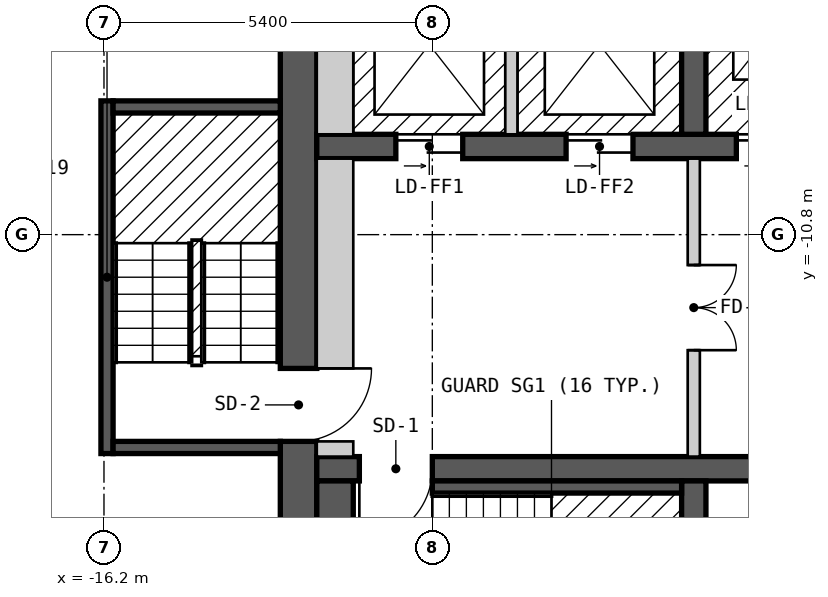
"""IFC4 building model, lengths in metres.
Left out: names, types, materials, properties, quantities, classifications, styles, units other than length and angle.
Written with IfcOpenShell. Run it as: python <this file> out.ifc"""

import sys

from ifc_helpers import new_model, si_unit, direction, frame, frame_2d, origin, origin_2d, place, context, subcontext, project, spatial, polyline, rectangle, outline, extrude, element, fill, save


model = new_model("IFC4")
c1 = context("Model", 3, precision=1e-05, world=origin(), true_north=direction((0.0, 1.0)))
c2 = subcontext(c1, "Body", "Model", "MODEL_VIEW")
j1 = project(units=[si_unit("LENGTHUNIT", "METRE"), si_unit("PLANEANGLEUNIT", "RADIAN")], contexts=[c1])
p1 = place(None, origin())
s1 = spatial("IfcSite", under=j1, at=p1, CompositionType="ELEMENT")
p2 = place(p1, origin())
s2 = spatial("IfcBuilding", under=s1, at=p2, CompositionType="ELEMENT")
p3 = place(p2, frame((0.0, 0.0, 166.2)))
s3 = spatial("IfcBuildingStorey", under=s2, at=p3, CompositionType="ELEMENT", Elevation=166.2)
p4 = place(p3, frame((-17.53, -15.736, 0.0), z_axis=(0.0, 0.0, 1.0), x_axis=(0.5, -0.866025403784, 0.0)))
e1 = element("IfcColumn", 1, at=p4, inside=s3, PredefinedType="COLUMN", context=c2, shape_type="SweptSolid", body=[
    extrude(rectangle(XDim=0.8, YDim=0.8, at=origin_2d()), origin(), (0.0, 0.0, 1.0), 3.0),
])
p5 = place(p3, frame((-13.0, -18.4, 0.0), z_axis=(0.0, 0.0, 1.0), x_axis=(0.0, 1.0, 0.0)))
e2 = element("IfcWall", 2, at=p5, inside=s3, PredefinedType="SHEAR", context=c2, shape_type="SweptSolid", body=[
    extrude(rectangle(XDim=12.8, YDim=0.6, at=frame_2d((6.4, 0.0))), origin(), (0.0, 0.0, 1.0), 2.7),
])
p6 = place(p5, frame((4.2, 0.0, 0.0)))
e3 = element("IfcOpeningElement", 3, at=p6, cuts=e2, PredefinedType="OPENING", context=c2, shape_type="SweptSolid", body=[
    extrude(rectangle(XDim=1.2, YDim=2.1, at=frame_2d((0.6, 1.05))), frame((0.0, 0.31, 0.0), z_axis=(0.0, -1.0, 0.0), x_axis=(1.0, 0.0, 0.0)), (0.0, 0.0, 1.0), 0.62),
])
p7 = place(p3, frame((-12.7, -14.65, 0.0), z_axis=(0.0, 0.0, 1.0), x_axis=(1.0, 0.0, 0.0)))
e4 = element("IfcWall", 4, at=p7, inside=s3, PredefinedType="SHEAR", context=c2, shape_type="SweptSolid", body=[
    extrude(rectangle(XDim=25.4, YDim=0.4, at=frame_2d((12.7, 0.0))), origin(), (0.0, 0.0, 1.0), 2.7),
])
p8 = place(p7, frame((1.9, 0.0, 0.0), z_axis=(0.0, 0.0, 1.0), x_axis=(-1.0, 0.0, 0.0)))
e5 = element("IfcOpeningElement", 5, at=p8, cuts=e4, PredefinedType="OPENING", context=c2, shape_type="SweptSolid", body=[
    extrude(rectangle(XDim=1.2, YDim=2.1, at=frame_2d((0.6, 1.05))), frame((0.0, 0.21, 0.0), z_axis=(0.0, -1.0, 0.0), x_axis=(1.0, 0.0, 0.0)), (0.0, 0.0, 1.0), 0.42),
])
p9 = place(p7, frame((24.75, 0.0, 0.0), z_axis=(0.0, 0.0, 1.0), x_axis=(-1.0, 0.0, 0.0)))
e6 = element("IfcOpeningElement", 6, at=p9, cuts=e4, PredefinedType="OPENING", context=c2, shape_type="SweptSolid", body=[
    extrude(rectangle(XDim=1.2, YDim=2.1, at=frame_2d((0.6, 1.05))), frame((0.0, 0.21, 0.0), z_axis=(0.0, -1.0, 0.0), x_axis=(1.0, 0.0, 0.0)), (0.0, 0.0, 1.0), 0.42),
])
p10 = place(p7, frame((8.6, 0.0, 0.0), z_axis=(0.0, 0.0, 1.0), x_axis=(-1.0, 0.0, 0.0)))
e7 = element("IfcOpeningElement", 7, at=p10, cuts=e4, PredefinedType="OPENING", context=c2, shape_type="SweptSolid", body=[
    extrude(rectangle(XDim=1.0, YDim=2.1, at=frame_2d((0.5, 1.05))), frame((0.0, 0.21, 0.0), z_axis=(0.0, -1.0, 0.0), x_axis=(1.0, 0.0, 0.0)), (0.0, 0.0, 1.0), 0.42),
])
p11 = place(p7, frame((11.35, 0.0, 0.0), z_axis=(0.0, 0.0, 1.0), x_axis=(-1.0, 0.0, 0.0)))
e8 = element("IfcOpeningElement", 8, at=p11, cuts=e4, PredefinedType="OPENING", context=c2, shape_type="SweptSolid", body=[
    extrude(rectangle(XDim=0.9, YDim=2.1, at=frame_2d((0.45, 1.05))), frame((0.0, 0.21, 0.0), z_axis=(0.0, -1.0, 0.0), x_axis=(1.0, 0.0, 0.0)), (0.0, 0.0, 1.0), 0.42),
])
p12 = place(p7, frame((14.15, 0.0, 0.0), z_axis=(0.0, 0.0, 1.0), x_axis=(-1.0, 0.0, 0.0)))
e9 = element("IfcOpeningElement", 9, at=p12, cuts=e4, PredefinedType="OPENING", context=c2, shape_type="SweptSolid", body=[
    extrude(rectangle(XDim=1.0, YDim=2.1, at=frame_2d((0.5, 1.05))), frame((0.0, 0.21, 0.0), z_axis=(0.0, -1.0, 0.0), x_axis=(1.0, 0.0, 0.0)), (0.0, 0.0, 1.0), 0.42),
])
p13 = place(p7, frame((17.75, 0.0, 0.0), z_axis=(0.0, 0.0, 1.0), x_axis=(-1.0, 0.0, 0.0)))
e10 = element("IfcOpeningElement", 10, at=p13, cuts=e4, PredefinedType="OPENING", context=c2, shape_type="SweptSolid", body=[
    extrude(rectangle(XDim=1.0, YDim=2.1, at=frame_2d((0.5, 1.05))), frame((0.0, 0.21, 0.0), z_axis=(0.0, -1.0, 0.0), x_axis=(1.0, 0.0, 0.0)), (0.0, 0.0, 1.0), 0.42),
])
p14 = place(p3, frame((-12.7, -9.35, 0.0), z_axis=(0.0, 0.0, 1.0), x_axis=(1.0, 0.0, 0.0)))
e11 = element("IfcWall", 11, at=p14, inside=s3, PredefinedType="SHEAR", context=c2, shape_type="SweptSolid", body=[
    extrude(rectangle(XDim=22.9, YDim=0.4, at=frame_2d((11.45, 0.0))), origin(), (0.0, 0.0, 1.0), 2.7),
])
p15 = place(p14, frame((1.3, 0.0, 0.0)))
e12 = element("IfcOpeningElement", 12, at=p15, cuts=e11, PredefinedType="OPENING", context=c2, shape_type="SweptSolid", body=[
    extrude(rectangle(XDim=1.1, YDim=2.1, at=frame_2d((0.55, 1.05))), frame((0.0, 0.21, 0.0), z_axis=(0.0, -1.0, 0.0), x_axis=(1.0, 0.0, 0.0)), (0.0, 0.0, 1.0), 0.42),
])
p16 = place(p14, frame((4.1, 0.0, 0.0)))
e13 = element("IfcOpeningElement", 13, at=p16, cuts=e11, PredefinedType="OPENING", context=c2, shape_type="SweptSolid", body=[
    extrude(rectangle(XDim=1.1, YDim=2.1, at=frame_2d((0.55, 1.05))), frame((0.0, 0.21, 0.0), z_axis=(0.0, -1.0, 0.0), x_axis=(1.0, 0.0, 0.0)), (0.0, 0.0, 1.0), 0.42),
])
p17 = place(p14, frame((6.9, 0.0, 0.0)))
e14 = element("IfcOpeningElement", 14, at=p17, cuts=e11, PredefinedType="OPENING", context=c2, shape_type="SweptSolid", body=[
    extrude(rectangle(XDim=1.1, YDim=2.1, at=frame_2d((0.55, 1.05))), frame((0.0, 0.21, 0.0), z_axis=(0.0, -1.0, 0.0), x_axis=(1.0, 0.0, 0.0)), (0.0, 0.0, 1.0), 0.42),
])
p18 = place(p14, frame((9.2, 0.0, 0.0)))
e15 = element("IfcOpeningElement", 15, at=p18, cuts=e11, PredefinedType="OPENING", context=c2, shape_type="SweptSolid", body=[
    extrude(rectangle(XDim=1.1, YDim=2.1, at=frame_2d((0.55, 1.05))), frame((0.0, 0.21, 0.0), z_axis=(0.0, -1.0, 0.0), x_axis=(1.0, 0.0, 0.0)), (0.0, 0.0, 1.0), 0.42),
])
p19 = place(p14, frame((11.5, 0.0, 0.0)))
e16 = element("IfcOpeningElement", 16, at=p19, cuts=e11, PredefinedType="OPENING", context=c2, shape_type="SweptSolid", body=[
    extrude(rectangle(XDim=1.1, YDim=2.1, at=frame_2d((0.55, 1.05))), frame((0.0, 0.21, 0.0), z_axis=(0.0, -1.0, 0.0), x_axis=(1.0, 0.0, 0.0)), (0.0, 0.0, 1.0), 0.42),
])
p20 = place(p14, frame((13.8, 0.0, 0.0)))
e17 = element("IfcOpeningElement", 17, at=p20, cuts=e11, PredefinedType="OPENING", context=c2, shape_type="SweptSolid", body=[
    extrude(rectangle(XDim=1.1, YDim=2.1, at=frame_2d((0.55, 1.05))), frame((0.0, 0.21, 0.0), z_axis=(0.0, -1.0, 0.0), x_axis=(1.0, 0.0, 0.0)), (0.0, 0.0, 1.0), 0.42),
])
p21 = place(p14, frame((16.1, 0.0, 0.0)))
e18 = element("IfcOpeningElement", 18, at=p21, cuts=e11, PredefinedType="OPENING", context=c2, shape_type="SweptSolid", body=[
    extrude(rectangle(XDim=1.1, YDim=2.1, at=frame_2d((0.55, 1.05))), frame((0.0, 0.21, 0.0), z_axis=(0.0, -1.0, 0.0), x_axis=(1.0, 0.0, 0.0)), (0.0, 0.0, 1.0), 0.42),
])
p22 = place(p14, frame((18.4, 0.0, 0.0)))
e19 = element("IfcOpeningElement", 19, at=p22, cuts=e11, PredefinedType="OPENING", context=c2, shape_type="SweptSolid", body=[
    extrude(rectangle(XDim=1.1, YDim=2.1, at=frame_2d((0.55, 1.05))), frame((0.0, 0.21, 0.0), z_axis=(0.0, -1.0, 0.0), x_axis=(1.0, 0.0, 0.0)), (0.0, 0.0, 1.0), 0.42),
])
p23 = place(p14, frame((20.8, 0.0, 0.0)))
e20 = element("IfcOpeningElement", 20, at=p23, cuts=e11, PredefinedType="OPENING", context=c2, shape_type="SweptSolid", body=[
    extrude(rectangle(XDim=1.1, YDim=2.1, at=frame_2d((0.55, 1.05))), frame((0.0, 0.21, 0.0), z_axis=(0.0, -1.0, 0.0), x_axis=(1.0, 0.0, 0.0)), (0.0, 0.0, 1.0), 0.42),
])
for number, where, z_axis, x_axis in (
    (21, (-6.5, -18.4, 0.0), (0.0, 0.0, 1.0), (0.0, 1.0, 0.0)),
    (22, (-6.5, -9.15, 0.0), (0.0, 0.0, 1.0), (0.0, 1.0, 0.0)),
):
    element("IfcWall", number, at=place(p3, frame(where, z_axis=z_axis, x_axis=x_axis)), inside=s3, PredefinedType="SHEAR", context=c2, shape_type="SweptSolid", body=[
        extrude(rectangle(XDim=3.55, YDim=0.4, at=frame_2d((1.775, 0.0))), origin(), (0.0, 0.0, 1.0), 2.7),
    ])
p24 = place(p3, frame((-26.024, -3.025, 0.0), z_axis=(0.0, 0.0, 1.0), x_axis=(0.500018670445, -0.86601462413, 0.0)))
e23 = element("IfcWall", 23, at=p24, inside=s3, PredefinedType="SOLIDWALL", context=c2, shape_type="SweptSolid", body=[
    extrude(outline(polyline([(0.0, -0.15), (20.785, -0.15), (20.705, 0.15), (0.08, 0.15), (0.0, -0.15)])), origin(), (0.0, 0.0, 1.0), 2.7),
])
p25 = place(p24, frame((1.13, 0.0, 0.15)))
e24 = element("IfcOpeningElement", 24, at=p25, cuts=e23, PredefinedType="OPENING", context=c2, shape_type="SweptSolid", body=[
    extrude(rectangle(XDim=1.5, YDim=2.1, at=frame_2d((0.75, 1.05))), frame((0.0, 0.16, 0.0), z_axis=(0.0, -1.0, 0.0), x_axis=(1.0, 0.0, 0.0)), (0.0, 0.0, 1.0), 0.32),
])
p26 = place(p24, frame((3.562, 0.0, 0.15)))
e25 = element("IfcOpeningElement", 25, at=p26, cuts=e23, PredefinedType="OPENING", context=c2, shape_type="SweptSolid", body=[
    extrude(rectangle(XDim=1.5, YDim=2.1, at=frame_2d((0.75, 1.05))), frame((0.0, 0.16, 0.0), z_axis=(0.0, -1.0, 0.0), x_axis=(1.0, 0.0, 0.0)), (0.0, 0.0, 1.0), 0.32),
])
p27 = place(p24, frame((5.994, 0.0, 0.15)))
e26 = element("IfcOpeningElement", 26, at=p27, cuts=e23, PredefinedType="OPENING", context=c2, shape_type="SweptSolid", body=[
    extrude(rectangle(XDim=1.5, YDim=2.1, at=frame_2d((0.75, 1.05))), frame((0.0, 0.16, 0.0), z_axis=(0.0, -1.0, 0.0), x_axis=(1.0, 0.0, 0.0)), (0.0, 0.0, 1.0), 0.32),
])
p28 = place(p24, frame((8.425, 0.0, 0.15)))
e27 = element("IfcOpeningElement", 27, at=p28, cuts=e23, PredefinedType="OPENING", context=c2, shape_type="SweptSolid", body=[
    extrude(rectangle(XDim=1.5, YDim=2.1, at=frame_2d((0.75, 1.05))), frame((0.0, 0.16, 0.0), z_axis=(0.0, -1.0, 0.0), x_axis=(1.0, 0.0, 0.0)), (0.0, 0.0, 1.0), 0.32),
])
p29 = place(p24, frame((10.857, 0.0, 0.15)))
e28 = element("IfcOpeningElement", 28, at=p29, cuts=e23, PredefinedType="OPENING", context=c2, shape_type="SweptSolid", body=[
    extrude(rectangle(XDim=1.5, YDim=2.1, at=frame_2d((0.75, 1.05))), frame((0.0, 0.16, 0.0), z_axis=(0.0, -1.0, 0.0), x_axis=(1.0, 0.0, 0.0)), (0.0, 0.0, 1.0), 0.32),
])
p30 = place(p24, frame((13.289, 0.0, 0.15)))
e29 = element("IfcOpeningElement", 29, at=p30, cuts=e23, PredefinedType="OPENING", context=c2, shape_type="SweptSolid", body=[
    extrude(rectangle(XDim=1.5, YDim=2.1, at=frame_2d((0.75, 1.05))), frame((0.0, 0.16, 0.0), z_axis=(0.0, -1.0, 0.0), x_axis=(1.0, 0.0, 0.0)), (0.0, 0.0, 1.0), 0.32),
])
p31 = place(p24, frame((15.722, 0.0, 0.15)))
e30 = element("IfcOpeningElement", 30, at=p31, cuts=e23, PredefinedType="OPENING", context=c2, shape_type="SweptSolid", body=[
    extrude(rectangle(XDim=1.5, YDim=2.1, at=frame_2d((0.75, 1.05))), frame((0.0, 0.16, 0.0), z_axis=(0.0, -1.0, 0.0), x_axis=(1.0, 0.0, 0.0)), (0.0, 0.0, 1.0), 0.32),
])
p32 = place(p24, frame((18.154, 0.0, 0.15)))
e31 = element("IfcOpeningElement", 31, at=p32, cuts=e23, PredefinedType="OPENING", context=c2, shape_type="SweptSolid", body=[
    extrude(rectangle(XDim=1.5, YDim=2.1, at=frame_2d((0.75, 1.05))), frame((0.0, 0.16, 0.0), z_axis=(0.0, -1.0, 0.0), x_axis=(1.0, 0.0, 0.0)), (0.0, 0.0, 1.0), 0.32),
])
p33 = place(p3, frame((-23.13, -7.737, 0.0), z_axis=(0.0, 0.0, 1.0), x_axis=(0.86598451299, 0.500070818246, 0.0)))
e32 = element("IfcWall", 32, at=p33, inside=s3, PredefinedType="PARTITIONING", context=c2, shape_type="SweptSolid", body=[
    extrude(rectangle(XDim=8.695, YDim=0.2, at=frame_2d((4.348, 0.0))), origin(), (0.0, 0.0, 1.0), 2.7),
])
p34 = place(p3, frame((-16.15, -14.4, 0.0), z_axis=(0.0, 0.0, 1.0), x_axis=(0.0, 1.0, 0.0)))
e33 = element("IfcWall", 33, at=p34, inside=s3, PredefinedType="SOLIDWALL", context=c2, shape_type="SweptSolid", body=[
    extrude(rectangle(XDim=5.8, YDim=0.2, at=frame_2d((2.9, 0.0))), origin(), (0.0, 0.0, 1.0), 2.7),
])
for number, where, z_axis, x_axis in (
    (34, (-16.05, -14.3, 0.0), (0.0, 0.0, 1.0), (1.0, 0.0, 0.0)),
    (35, (-16.05, -8.7, 0.0), (0.0, 0.0, 1.0), (1.0, 0.0, 0.0)),
):
    element("IfcWall", number, at=place(p3, frame(where, z_axis=z_axis, x_axis=x_axis)), inside=s3, PredefinedType="SOLIDWALL", context=c2, shape_type="SweptSolid", body=[
        extrude(rectangle(XDim=2.75, YDim=0.2, at=frame_2d((1.375, 0.0))), origin(), (0.0, 0.0, 1.0), 2.7),
    ])
p35 = place(p3, frame((-12.4, -18.4, 0.0), z_axis=(0.0, 0.0, 1.0), x_axis=(0.0, 1.0, 0.0)))
e36 = element("IfcWall", 36, at=p35, inside=s3, PredefinedType="SOLIDWALL", context=c2, shape_type="SweptSolid", body=[
    extrude(rectangle(XDim=3.55, YDim=0.6, at=frame_2d((1.775, 0.0))), origin(), (0.0, 0.0, 1.0), 2.7),
])
p36 = place(p3, frame((-12.7, -14.325, 0.0), z_axis=(0.0, 0.0, 1.0), x_axis=(1.0, 0.0, 0.0)))
e37 = element("IfcWall", 37, at=p36, inside=s3, PredefinedType="PARTITIONING", context=c2, shape_type="SweptSolid", body=[
    extrude(rectangle(XDim=0.6, YDim=0.25, at=frame_2d((0.3, 0.0))), origin(), (0.0, 0.0, 1.0), 2.7),
])
p37 = place(p3, frame((-12.4, -13.0, 0.0), z_axis=(0.0, 0.0, 1.0), x_axis=(0.0, 1.0, 0.0)))
e38 = element("IfcWall", 38, at=p37, inside=s3, PredefinedType="PARTITIONING", context=c2, shape_type="SweptSolid", body=[
    extrude(rectangle(XDim=3.45, YDim=0.6, at=frame_2d((1.725, 0.0))), origin(), (0.0, 0.0, 1.0), 2.7),
])
p38 = place(p3, frame((-12.4, -9.15, 0.0), z_axis=(0.0, 0.0, 1.0), x_axis=(0.0, 1.0, 0.0)))
e39 = element("IfcWall", 39, at=p38, inside=s3, PredefinedType="SOLIDWALL", context=c2, shape_type="SweptSolid", body=[
    extrude(rectangle(XDim=3.55, YDim=0.6, at=frame_2d((1.775, 0.0))), origin(), (0.0, 0.0, 1.0), 2.7),
])
p39 = place(p3, frame((-10.8, -14.95, 0.0), z_axis=(0.0, 0.0, 1.0), x_axis=(1.0, 0.0, 0.0)))
e40 = element("IfcWall", 40, at=p39, inside=s3, PredefinedType="SOLIDWALL", context=c2, shape_type="SweptSolid", body=[
    extrude(rectangle(XDim=4.1, YDim=0.2, at=frame_2d((2.05, 0.0))), origin(), (0.0, 0.0, 1.0), 2.7),
])
p40 = place(p3, frame((-9.5, -9.15, 0.0), z_axis=(0.0, 0.0, 1.0), x_axis=(0.0, 1.0, 0.0)))
e41 = element("IfcWall", 41, at=p40, inside=s3, PredefinedType="SOLIDWALL", context=c2, shape_type="SweptSolid", body=[
    extrude(rectangle(XDim=2.95, YDim=0.2, at=frame_2d((1.475, 0.0))), origin(), (0.0, 0.0, 1.0), 2.7),
])
p41 = place(p3, frame((-6.5, -14.45, 0.0), z_axis=(0.0, 0.0, 1.0), x_axis=(0.0, 1.0, 0.0)))
e42 = element("IfcWall", 42, at=p41, inside=s3, PredefinedType="PARTITIONING", context=c2, shape_type="SweptSolid", body=[
    extrude(rectangle(XDim=4.9, YDim=0.2, at=frame_2d((2.45, 0.0))), origin(), (0.0, 0.0, 1.0), 2.7),
])
p42 = place(p41, frame((3.15, 0.0, 0.0), z_axis=(0.0, 0.0, 1.0), x_axis=(-1.0, 0.0, 0.0)))
e43 = element("IfcOpeningElement", 43, at=p42, cuts=e42, PredefinedType="OPENING", context=c2, shape_type="SweptSolid", body=[
    extrude(rectangle(XDim=1.4, YDim=2.1, at=frame_2d((0.7, 1.05))), frame((0.0, 0.11, 0.0), z_axis=(0.0, -1.0, 0.0), x_axis=(1.0, 0.0, 0.0)), (0.0, 0.0, 1.0), 0.22),
])
p43 = place(p15, origin())
e44 = element("IfcDoor", 44, at=p43, inside=s3, OperationType="DOUBLE_DOOR_SLIDING", PredefinedType="DOOR", context=c2, shape_type="SweptSolid", body=[
    extrude(rectangle(XDim=1.1, YDim=2.1, at=frame_2d((0.55, 1.05))), frame((0.0, 0.025, 0.0), z_axis=(0.0, -1.0, 0.0), x_axis=(1.0, 0.0, 0.0)), (0.0, 0.0, 1.0), 0.05),
])
fill(e12, e44)
p44 = place(p16, origin())
e45 = element("IfcDoor", 45, at=p44, inside=s3, OperationType="DOUBLE_DOOR_SLIDING", PredefinedType="DOOR", context=c2, shape_type="SweptSolid", body=[
    extrude(rectangle(XDim=1.1, YDim=2.1, at=frame_2d((0.55, 1.05))), frame((0.0, 0.025, 0.0), z_axis=(0.0, -1.0, 0.0), x_axis=(1.0, 0.0, 0.0)), (0.0, 0.0, 1.0), 0.05),
])
fill(e13, e45)
p45 = place(p17, origin())
e46 = element("IfcDoor", 46, at=p45, inside=s3, OperationType="DOUBLE_DOOR_SLIDING", PredefinedType="DOOR", context=c2, shape_type="SweptSolid", body=[
    extrude(rectangle(XDim=1.1, YDim=2.1, at=frame_2d((0.55, 1.05))), frame((0.0, 0.025, 0.0), z_axis=(0.0, -1.0, 0.0), x_axis=(1.0, 0.0, 0.0)), (0.0, 0.0, 1.0), 0.05),
])
fill(e14, e46)
p46 = place(p8, origin())
e47 = element("IfcDoor", 47, at=p46, inside=s3, OperationType="SINGLE_SWING_RIGHT", PredefinedType="DOOR", context=c2, shape_type="SweptSolid", body=[
    extrude(rectangle(XDim=1.2, YDim=2.1, at=frame_2d((0.6, 1.05))), frame((0.0, 0.025, 0.0), z_axis=(0.0, -1.0, 0.0), x_axis=(1.0, 0.0, 0.0)), (0.0, 0.0, 1.0), 0.05),
])
fill(e5, e47)
p47 = place(p6, origin())
e48 = element("IfcDoor", 48, at=p47, inside=s3, OperationType="SINGLE_SWING_RIGHT", PredefinedType="DOOR", context=c2, shape_type="SweptSolid", body=[
    extrude(rectangle(XDim=1.2, YDim=2.1, at=frame_2d((0.6, 1.05))), frame((0.0, 0.025, 0.0), z_axis=(0.0, -1.0, 0.0), x_axis=(1.0, 0.0, 0.0)), (0.0, 0.0, 1.0), 0.05),
])
fill(e3, e48)
p48 = place(p42, origin())
e49 = element("IfcDoor", 49, at=p48, inside=s3, OperationType="DOUBLE_DOOR_SINGLE_SWING", PredefinedType="DOOR", context=c2, shape_type="SweptSolid", body=[
    extrude(rectangle(XDim=1.4, YDim=2.1, at=frame_2d((0.7, 1.05))), frame((0.0, 0.025, 0.0), z_axis=(0.0, -1.0, 0.0), x_axis=(1.0, 0.0, 0.0)), (0.0, 0.0, 1.0), 0.05),
])
fill(e43, e49)
save(model, sys.argv[1])
